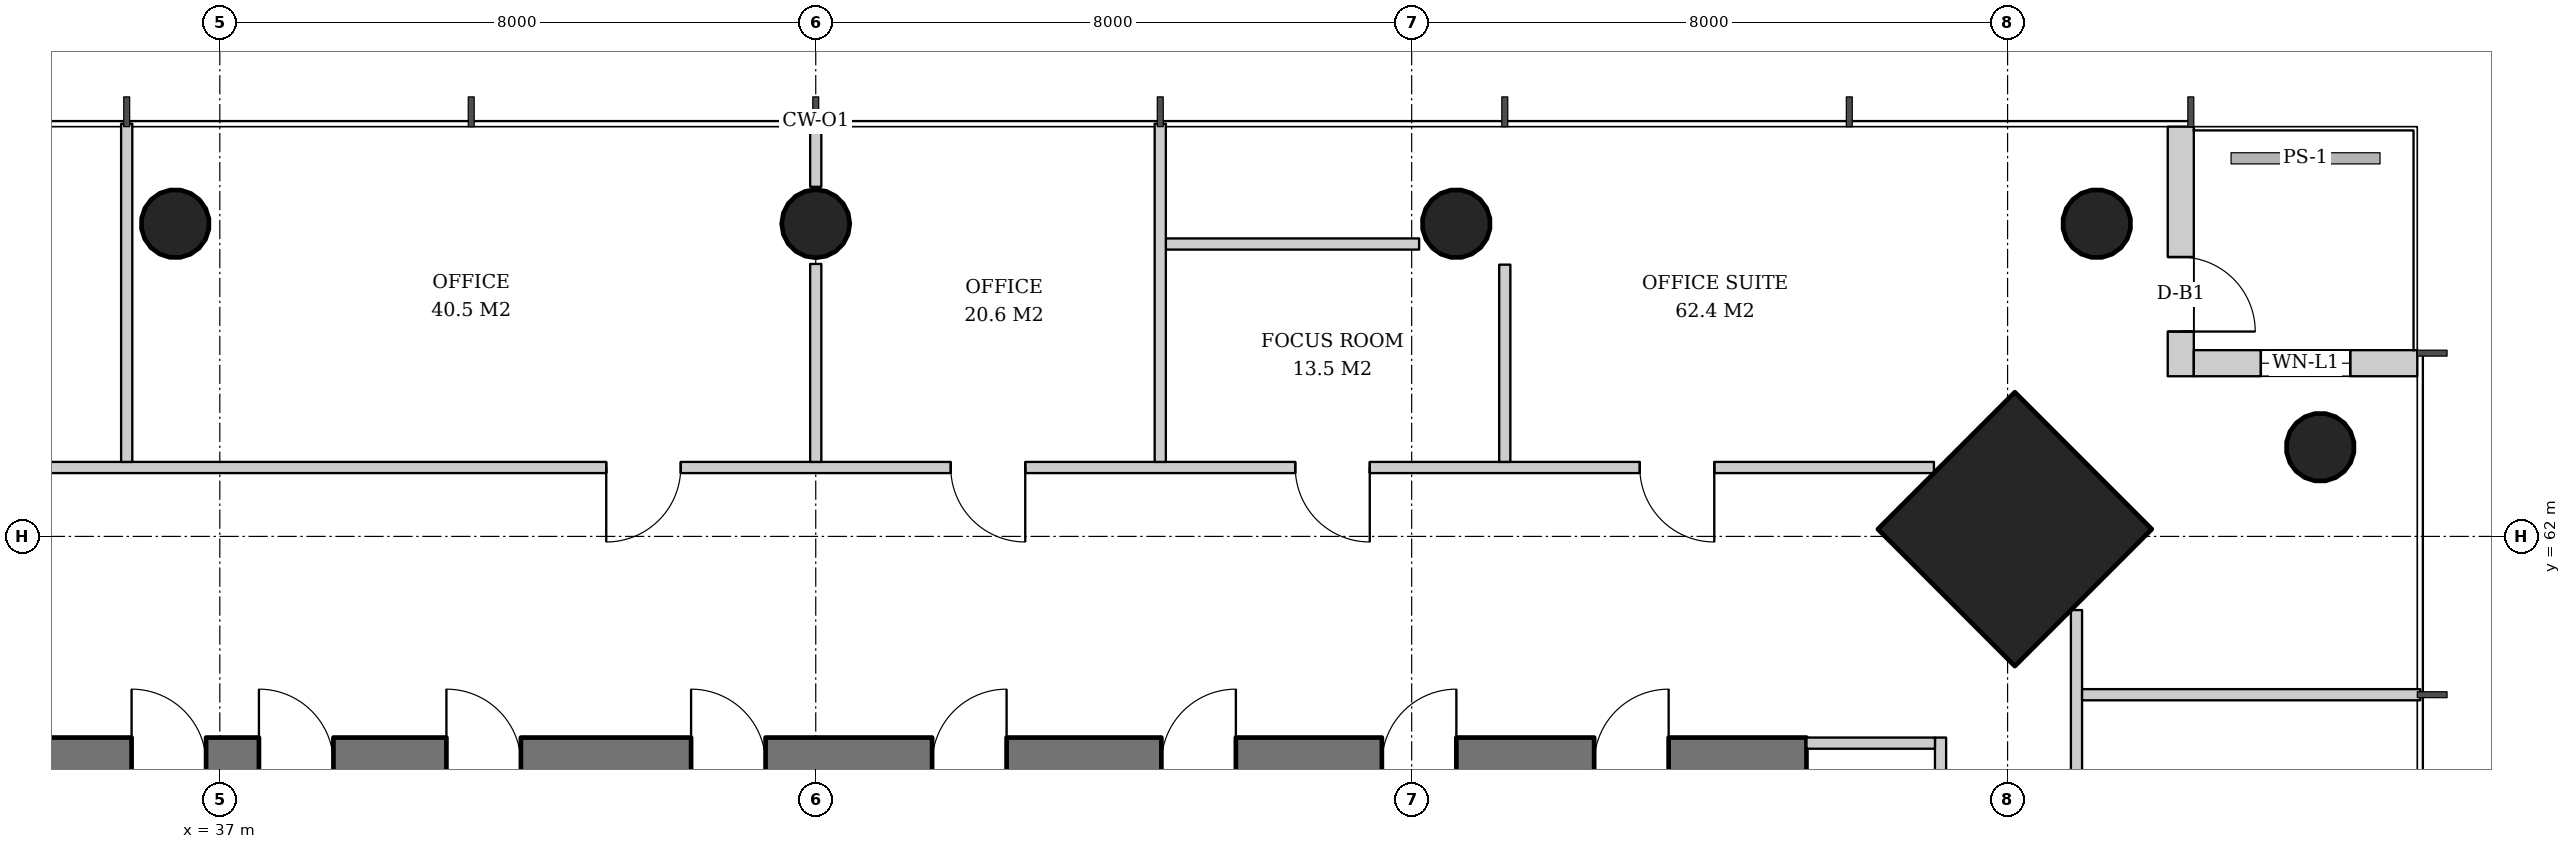
"""IFC4 building model, lengths in metres.
Left out: names, types, materials, properties, quantities, classifications, styles, units other than length and angle.
Written with IfcOpenShell. Run it as: python <this file> out.ifc"""

import sys

from ifc_helpers import new_model, si_unit, direction, frame, frame_2d, origin, origin_2d, place, context, subcontext, project, spatial, rectangle, hollow_circle, extrude, element, fill, save


model = new_model("IFC4")
c1 = context("Model", 3, precision=1e-05, world=origin(), true_north=direction((0.0, 1.0)))
c2 = subcontext(c1, "Body", "Model", "MODEL_VIEW")
j1 = project(units=[si_unit("LENGTHUNIT", "METRE"), si_unit("PLANEANGLEUNIT", "RADIAN")], contexts=[c1])
p1 = place(None, origin())
s1 = spatial("IfcSite", under=j1, at=p1, CompositionType="ELEMENT")
p2 = place(p1, origin())
s2 = spatial("IfcBuilding", under=s1, at=p2, CompositionType="ELEMENT")
p3 = place(p2, frame((0.0, 0.0, 138.8)))
s3 = spatial("IfcBuildingStorey", under=s2, at=p3, CompositionType="ELEMENT", Elevation=138.8)
p4 = place(p3, frame((61.136, 62.136, 0.0), z_axis=(-0.031898107953, -0.031898107953, 0.998981992539), x_axis=(0.707106781187, -0.707106781187, 0.0)))
e1 = element("IfcColumn", 1, at=p4, inside=s3, PredefinedType="COLUMN", context=c2, shape_type="SweptSolid", body=[
    extrude(rectangle(XDim=2.6, YDim=2.6, at=origin_2d()), origin(), (0.0, 0.0, 1.0), 3.804),
])
for number, where, z_axis, x_axis in (
    (2, (65.236, 63.236, 0.0), (-0.032, -0.032, 0.999), (0.707, -0.707, 0.0)),
    (3, (62.236, 66.236, 0.0), (-0.032, -0.032, 0.999), (0.707, -0.707, 0.0)),
):
    element("IfcColumn", number, at=place(p3, frame(where, z_axis=z_axis, x_axis=x_axis)), inside=s3, PredefinedType="COLUMN", context=c2, shape_type="SweptSolid", body=[
        extrude(hollow_circle(Radius=0.457, WallThickness=0.03, at=origin_2d()), origin(), (0.0, 0.0, 1.0), 3.804),
    ])
p5 = place(p3, frame((53.618, 66.236, 0.0), z_axis=(-0.015987237665, -0.031910269556, 0.999362868496), x_axis=(0.894067115991, -0.447933021895, 0.0)))
e4 = element("IfcColumn", 4, at=p5, inside=s3, PredefinedType="COLUMN", context=c2, shape_type="SweptSolid", body=[
    extrude(hollow_circle(Radius=0.457, WallThickness=0.03, at=origin_2d()), origin(), (0.0, 0.0, 1.0), 3.802),
])
p6 = place(p3, frame((45.0, 66.236, 0.0), z_axis=(0.0, -0.031914348339, 0.999490607445), x_axis=(1.0, 0.0, 0.0)))
e5 = element("IfcColumn", 5, at=p6, inside=s3, PredefinedType="COLUMN", context=c2, shape_type="SweptSolid", body=[
    extrude(hollow_circle(Radius=0.457, WallThickness=0.03, at=origin_2d()), origin(), (0.0, 0.0, 1.0), 3.802),
])
p7 = place(p3, frame((36.382, 66.236, 0.0), z_axis=(0.015987237665, -0.031910269556, 0.999362868496), x_axis=(0.894067115991, 0.447933021895, 0.0)))
e6 = element("IfcColumn", 6, at=p7, inside=s3, PredefinedType="COLUMN", context=c2, shape_type="SweptSolid", body=[
    extrude(hollow_circle(Radius=0.457, WallThickness=0.03, at=origin_2d()), origin(), (0.0, 0.0, 1.0), 3.802),
])
p8 = place(p3, frame((31.7, 58.95, 0.0), z_axis=(0.0, 0.0, 1.0), x_axis=(1.0, 0.0, 0.0)))
e7 = element("IfcWall", 7, at=p8, inside=s3, PredefinedType="SHEAR", context=c2, shape_type="SweptSolid", body=[
    extrude(rectangle(XDim=26.6, YDim=0.7, at=frame_2d((13.3, 0.0))), origin(), (0.0, 0.0, 1.0), 3.8),
])
p9 = place(p8, frame((17.94, 0.0, 0.0)))
e8 = element("IfcOpeningElement", 8, at=p9, cuts=e7, PredefinedType="OPENING", context=c2, shape_type="SweptSolid", body=[
    extrude(rectangle(XDim=1.0, YDim=2.1, at=frame_2d((0.5, 1.05))), frame((0.0, 0.36, 0.0), z_axis=(0.0, -1.0, 0.0), x_axis=(1.0, 0.0, 0.0)), (0.0, 0.0, 1.0), 0.72),
])
p10 = place(p8, frame((5.825, 0.0, 0.0)))
e9 = element("IfcOpeningElement", 9, at=p10, cuts=e7, PredefinedType="OPENING", context=c2, shape_type="SweptSolid", body=[
    extrude(rectangle(XDim=1.0, YDim=2.1, at=frame_2d((0.5, 1.05))), frame((0.0, 0.36, 0.0), z_axis=(0.0, -1.0, 0.0), x_axis=(1.0, 0.0, 0.0)), (0.0, 0.0, 1.0), 0.72),
])
p11 = place(p8, frame((1.85, 0.0, 0.0)))
e10 = element("IfcOpeningElement", 10, at=p11, cuts=e7, PredefinedType="OPENING", context=c2, shape_type="SweptSolid", body=[
    extrude(rectangle(XDim=1.0, YDim=2.1, at=frame_2d((0.5, 1.05))), frame((0.0, 0.36, 0.0), z_axis=(0.0, -1.0, 0.0), x_axis=(1.0, 0.0, 0.0)), (0.0, 0.0, 1.0), 0.72),
])
p12 = place(p8, frame((4.115, 0.0, 0.0)))
e11 = element("IfcOpeningElement", 11, at=p12, cuts=e7, PredefinedType="OPENING", context=c2, shape_type="SweptSolid", body=[
    extrude(rectangle(XDim=1.0, YDim=2.1, at=frame_2d((0.5, 1.05))), frame((0.0, 0.36, 0.0), z_axis=(0.0, -1.0, 0.0), x_axis=(1.0, 0.0, 0.0)), (0.0, 0.0, 1.0), 0.72),
])
p13 = place(p8, frame((8.342, 0.0, 0.0)))
e12 = element("IfcOpeningElement", 12, at=p13, cuts=e7, PredefinedType="OPENING", context=c2, shape_type="SweptSolid", body=[
    extrude(rectangle(XDim=1.0, YDim=2.1, at=frame_2d((0.5, 1.05))), frame((0.0, 0.36, 0.0), z_axis=(0.0, -1.0, 0.0), x_axis=(1.0, 0.0, 0.0)), (0.0, 0.0, 1.0), 0.72),
])
p14 = place(p8, frame((11.626, 0.0, 0.0)))
e13 = element("IfcOpeningElement", 13, at=p14, cuts=e7, PredefinedType="OPENING", context=c2, shape_type="SweptSolid", body=[
    extrude(rectangle(XDim=1.0, YDim=2.1, at=frame_2d((0.5, 1.05))), frame((0.0, 0.36, 0.0), z_axis=(0.0, -1.0, 0.0), x_axis=(1.0, 0.0, 0.0)), (0.0, 0.0, 1.0), 0.72),
])
p15 = place(p8, frame((14.862, 0.0, 0.0)))
e14 = element("IfcOpeningElement", 14, at=p15, cuts=e7, PredefinedType="OPENING", context=c2, shape_type="SweptSolid", body=[
    extrude(rectangle(XDim=1.0, YDim=2.1, at=frame_2d((0.5, 1.05))), frame((0.0, 0.36, 0.0), z_axis=(0.0, -1.0, 0.0), x_axis=(1.0, 0.0, 0.0)), (0.0, 0.0, 1.0), 0.72),
])
p16 = place(p8, frame((20.9, 0.0, 0.0)))
e15 = element("IfcOpeningElement", 15, at=p16, cuts=e7, PredefinedType="OPENING", context=c2, shape_type="SweptSolid", body=[
    extrude(rectangle(XDim=1.0, YDim=2.1, at=frame_2d((0.5, 1.05))), frame((0.0, 0.36, 0.0), z_axis=(0.0, -1.0, 0.0), x_axis=(1.0, 0.0, 0.0)), (0.0, 0.0, 1.0), 0.72),
])
p17 = place(p8, frame((23.75, 0.0, 0.0)))
e16 = element("IfcOpeningElement", 16, at=p17, cuts=e7, PredefinedType="OPENING", context=c2, shape_type="SweptSolid", body=[
    extrude(rectangle(XDim=1.0, YDim=2.1, at=frame_2d((0.5, 1.05))), frame((0.0, 0.36, 0.0), z_axis=(0.0, -1.0, 0.0), x_axis=(1.0, 0.0, 0.0)), (0.0, 0.0, 1.0), 0.72),
])
p18 = place(p3, frame((63.325, 67.5, 0.0), z_axis=(0.0, 0.0, 1.0), x_axis=(0.0, -1.0, 0.0)))
e17 = element("IfcWall", 17, at=p18, inside=s3, PredefinedType="SOLIDWALL", context=c2, shape_type="SweptSolid", body=[
    extrude(rectangle(XDim=3.35, YDim=0.35, at=frame_2d((1.675, 0.0))), origin(), (0.0, 0.0, 1.0), 3.62),
])
p19 = place(p18, frame((1.75, 0.0, 0.0)))
e18 = element("IfcOpeningElement", 18, at=p19, cuts=e17, PredefinedType="OPENING", context=c2, shape_type="SweptSolid", body=[
    extrude(rectangle(XDim=1.0, YDim=2.4, at=frame_2d((0.5, 1.2))), frame((0.0, 0.185, 0.0), z_axis=(0.0, -1.0, 0.0), x_axis=(1.0, 0.0, 0.0)), (0.0, 0.0, 1.0), 0.37),
])
p20 = place(p3, frame((63.5, 64.325, 0.0), z_axis=(0.0, 0.0, 1.0), x_axis=(1.0, 0.0, 0.0)))
e19 = element("IfcWall", 19, at=p20, inside=s3, PredefinedType="SOLIDWALL", context=c2, shape_type="SweptSolid", body=[
    extrude(rectangle(XDim=3.0, YDim=0.35, at=frame_2d((1.5, 0.0))), origin(), (0.0, 0.0, 1.0), 3.62),
])
p21 = place(p20, frame((0.9, 0.0, 0.6)))
e20 = element("IfcOpeningElement", 20, at=p21, cuts=e19, PredefinedType="OPENING", context=c2, shape_type="SweptSolid", body=[
    extrude(rectangle(XDim=1.2, YDim=2.55, at=frame_2d((0.6, 1.275))), frame((0.0, 0.185, 0.0), z_axis=(0.0, -1.0, 0.0), x_axis=(1.0, 0.0, 0.0)), (0.0, 0.0, 1.0), 0.37),
])
p22 = place(p3, frame((60.1, 48.025, 0.0), z_axis=(0.0, 0.0, 1.0), x_axis=(0.0, 1.0, 0.0)))
e21 = element("IfcWall", 21, at=p22, inside=s3, PredefinedType="PARTITIONING", context=c2, shape_type="SweptSolid", body=[
    extrude(rectangle(XDim=11.275, YDim=0.15, at=frame_2d((5.638, 0.0))), origin(), (0.0, 0.0, 1.0), 2.806),
])
p23 = place(p22, frame((5.137, 0.0, 0.0)))
e22 = element("IfcOpeningElement", 22, at=p23, cuts=e21, PredefinedType="OPENING", context=c2, shape_type="SweptSolid", body=[
    extrude(rectangle(XDim=1.0, YDim=2.1, at=frame_2d((0.5, 1.05))), frame((0.0, 0.085, 0.0), z_axis=(0.0, -1.0, 0.0), x_axis=(1.0, 0.0, 0.0)), (0.0, 0.0, 1.0), 0.17),
])
p24 = place(p3, frame((58.3, 59.225, 0.0), z_axis=(0.0, 0.0, 1.0), x_axis=(1.0, 0.0, 0.0)))
e23 = element("IfcWall", 23, at=p24, inside=s3, PredefinedType="PARTITIONING", context=c2, shape_type="SweptSolid", body=[
    extrude(rectangle(XDim=1.725, YDim=0.15, at=frame_2d((0.862, 0.0))), origin(), (0.0, 0.0, 1.0), 3.62),
])
p25 = place(p3, frame((61.925, 30.989, 0.0), z_axis=(0.0, 0.0, 1.0), x_axis=(0.0, 1.0, 0.0)))
e24 = element("IfcWall", 24, at=p25, inside=s3, PredefinedType="PARTITIONING", context=c2, shape_type="SweptSolid", body=[
    extrude(rectangle(XDim=30.023, YDim=0.15, at=frame_2d((15.011, 0.0))), origin(), (0.0, 0.0, 1.0), 2.72),
])
p26 = place(p25, frame((2.949, 0.0, 0.0)))
e25 = element("IfcOpeningElement", 25, at=p26, cuts=e24, PredefinedType="OPENING", context=c2, shape_type="SweptSolid", body=[
    extrude(rectangle(XDim=1.0, YDim=2.1, at=frame_2d((0.5, 1.05))), frame((0.0, 0.085, 0.0), z_axis=(0.0, -1.0, 0.0), x_axis=(1.0, 0.0, 0.0)), (0.0, 0.0, 1.0), 0.17),
])
p27 = place(p25, frame((7.574, 0.0, 0.0)))
e26 = element("IfcOpeningElement", 26, at=p27, cuts=e24, PredefinedType="OPENING", context=c2, shape_type="SweptSolid", body=[
    extrude(rectangle(XDim=1.0, YDim=2.1, at=frame_2d((0.5, 1.05))), frame((0.0, 0.085, 0.0), z_axis=(0.0, -1.0, 0.0), x_axis=(1.0, 0.0, 0.0)), (0.0, 0.0, 1.0), 0.17),
])
p28 = place(p25, frame((12.199, 0.0, 0.0)))
e27 = element("IfcOpeningElement", 27, at=p28, cuts=e24, PredefinedType="OPENING", context=c2, shape_type="SweptSolid", body=[
    extrude(rectangle(XDim=1.0, YDim=2.1, at=frame_2d((0.5, 1.05))), frame((0.0, 0.085, 0.0), z_axis=(0.0, -1.0, 0.0), x_axis=(1.0, 0.0, 0.0)), (0.0, 0.0, 1.0), 0.17),
])
p29 = place(p25, frame((16.824, 0.0, 0.0)))
e28 = element("IfcOpeningElement", 28, at=p29, cuts=e24, PredefinedType="OPENING", context=c2, shape_type="SweptSolid", body=[
    extrude(rectangle(XDim=1.0, YDim=2.1, at=frame_2d((0.5, 1.05))), frame((0.0, 0.085, 0.0), z_axis=(0.0, -1.0, 0.0), x_axis=(1.0, 0.0, 0.0)), (0.0, 0.0, 1.0), 0.17),
])
p30 = place(p25, frame((21.449, 0.0, 0.0)))
e29 = element("IfcOpeningElement", 29, at=p30, cuts=e24, PredefinedType="OPENING", context=c2, shape_type="SweptSolid", body=[
    extrude(rectangle(XDim=1.0, YDim=2.1, at=frame_2d((0.5, 1.05))), frame((0.0, 0.085, 0.0), z_axis=(0.0, -1.0, 0.0), x_axis=(1.0, 0.0, 0.0)), (0.0, 0.0, 1.0), 0.17),
])
p31 = place(p25, frame((26.074, 0.0, 0.0)))
e30 = element("IfcOpeningElement", 30, at=p31, cuts=e24, PredefinedType="OPENING", context=c2, shape_type="SweptSolid", body=[
    extrude(rectangle(XDim=1.0, YDim=2.1, at=frame_2d((0.5, 1.05))), frame((0.0, 0.085, 0.0), z_axis=(0.0, -1.0, 0.0), x_axis=(1.0, 0.0, 0.0)), (0.0, 0.0, 1.0), 0.17),
])
p32 = place(p3, frame((62.0, 59.875, 0.0), z_axis=(0.0, 0.0, 1.0), x_axis=(1.0, 0.0, 0.0)))
e31 = element("IfcWall", 31, at=p32, inside=s3, PredefinedType="PARTITIONING", context=c2, shape_type="SweptSolid", body=[
    extrude(rectangle(XDim=4.54, YDim=0.15, at=frame_2d((2.27, 0.0))), origin(), (0.0, 0.0, 1.0), 2.82),
])
p33 = place(p3, frame((53.1, 65.925, 0.0), z_axis=(0.0, 0.0, 1.0), x_axis=(-1.0, 0.0, 0.0)))
e32 = element("IfcWall", 32, at=p33, inside=s3, PredefinedType="PARTITIONING", context=c2, shape_type="SweptSolid", body=[
    extrude(rectangle(XDim=3.4, YDim=0.15, at=frame_2d((1.7, 0.0))), origin(), (0.0, 0.0, 1.0), 2.82),
])
p34 = place(p3, frame((60.011, 62.925, 0.0), z_axis=(0.0, 0.0, 1.0), x_axis=(-1.0, 0.0, 0.0)))
e33 = element("IfcWall", 33, at=p34, inside=s3, PredefinedType="PARTITIONING", context=c2, shape_type="SweptSolid", body=[
    extrude(rectangle(XDim=30.023, YDim=0.15, at=frame_2d((15.011, 0.0))), origin(), (0.0, 0.0, 1.0), 2.72),
])
p35 = place(p34, frame((2.949, 0.0, 0.0)))
e34 = element("IfcOpeningElement", 34, at=p35, cuts=e33, PredefinedType="OPENING", context=c2, shape_type="SweptSolid", body=[
    extrude(rectangle(XDim=1.0, YDim=2.1, at=frame_2d((0.5, 1.05))), frame((0.0, 0.085, 0.0), z_axis=(0.0, -1.0, 0.0), x_axis=(1.0, 0.0, 0.0)), (0.0, 0.0, 1.0), 0.17),
])
p36 = place(p34, frame((7.574, 0.0, 0.0)))
e35 = element("IfcOpeningElement", 35, at=p36, cuts=e33, PredefinedType="OPENING", context=c2, shape_type="SweptSolid", body=[
    extrude(rectangle(XDim=1.0, YDim=2.1, at=frame_2d((0.5, 1.05))), frame((0.0, 0.085, 0.0), z_axis=(0.0, -1.0, 0.0), x_axis=(1.0, 0.0, 0.0)), (0.0, 0.0, 1.0), 0.17),
])
p37 = place(p34, frame((12.199, 0.0, 0.0)))
e36 = element("IfcOpeningElement", 36, at=p37, cuts=e33, PredefinedType="OPENING", context=c2, shape_type="SweptSolid", body=[
    extrude(rectangle(XDim=1.0, YDim=2.1, at=frame_2d((0.5, 1.05))), frame((0.0, 0.085, 0.0), z_axis=(0.0, -1.0, 0.0), x_axis=(1.0, 0.0, 0.0)), (0.0, 0.0, 1.0), 0.17),
])
p38 = place(p34, frame((16.824, 0.0, 0.0)))
e37 = element("IfcOpeningElement", 37, at=p38, cuts=e33, PredefinedType="OPENING", context=c2, shape_type="SweptSolid", body=[
    extrude(rectangle(XDim=1.0, YDim=2.1, at=frame_2d((0.5, 1.05))), frame((0.0, 0.085, 0.0), z_axis=(0.0, -1.0, 0.0), x_axis=(1.0, 0.0, 0.0)), (0.0, 0.0, 1.0), 0.17),
])
p39 = place(p34, frame((26.074, 0.0, 0.0)))
e38 = element("IfcOpeningElement", 38, at=p39, cuts=e33, PredefinedType="OPENING", context=c2, shape_type="SweptSolid", body=[
    extrude(rectangle(XDim=1.0, YDim=2.1, at=frame_2d((0.5, 1.05))), frame((0.0, 0.085, 0.0), z_axis=(0.0, -1.0, 0.0), x_axis=(1.0, 0.0, 0.0)), (0.0, 0.0, 1.0), 0.17),
])
p40 = place(p3, frame((54.25, 63.0, 0.0), z_axis=(0.0, 0.0, 1.0), x_axis=(0.0, 1.0, 0.0)))
e39 = element("IfcWall", 39, at=p40, inside=s3, PredefinedType="PARTITIONING", context=c2, shape_type="SweptSolid", body=[
    extrude(rectangle(XDim=2.648, YDim=0.15, at=frame_2d((1.324, 0.0))), origin(), (0.0, 0.0, 1.0), 3.62),
])
p41 = place(p3, frame((49.625, 63.0, 0.0), z_axis=(0.0, 0.0, 1.0), x_axis=(0.0, 1.0, 0.0)))
e40 = element("IfcWall", 40, at=p41, inside=s3, PredefinedType="PARTITIONING", context=c2, shape_type="SweptSolid", body=[
    extrude(rectangle(XDim=4.54, YDim=0.15, at=frame_2d((2.27, 0.0))), origin(), (0.0, 0.0, 1.0), 2.82),
])
p42 = place(p3, frame((45.0, 63.0, 0.0), z_axis=(0.0, 0.0, 1.0), x_axis=(0.0, 1.0, 0.0)))
e41 = element("IfcWall", 41, at=p42, inside=s3, PredefinedType="PARTITIONING", context=c2, shape_type="SweptSolid", body=[
    extrude(rectangle(XDim=2.657, YDim=0.15, at=frame_2d((1.329, 0.0))), origin(), (0.0, 0.0, 1.0), 3.62),
])
p43 = place(p3, frame((45.0, 66.693, 0.0), z_axis=(0.0, 0.0, 1.0), x_axis=(0.0, 1.0, 0.0)))
e42 = element("IfcWall", 42, at=p43, inside=s3, PredefinedType="PARTITIONING", context=c2, shape_type="SweptSolid", body=[
    extrude(rectangle(XDim=0.847, YDim=0.15, at=frame_2d((0.424, 0.0))), origin(), (0.0, 0.0, 1.0), 3.62),
])
p44 = place(p3, frame((35.75, 63.0, 0.0), z_axis=(0.0, 0.0, 1.0), x_axis=(0.0, 1.0, 0.0)))
e43 = element("IfcWall", 43, at=p44, inside=s3, PredefinedType="PARTITIONING", context=c2, shape_type="SweptSolid", body=[
    extrude(rectangle(XDim=4.54, YDim=0.15, at=frame_2d((2.27, 0.0))), origin(), (0.0, 0.0, 1.0), 2.82),
])
p45 = place(p19, origin())
e44 = element("IfcDoor", 44, at=p45, inside=s3, OperationType="SINGLE_SWING_RIGHT", PredefinedType="DOOR", context=c2, shape_type="SweptSolid", body=[
    extrude(rectangle(XDim=1.0, YDim=2.4, at=frame_2d((0.5, 1.2))), frame((0.0, 0.025, 0.0), z_axis=(0.0, -1.0, 0.0), x_axis=(1.0, 0.0, 0.0)), (0.0, 0.0, 1.0), 0.05),
])
fill(e18, e44)
p46 = place(p21, origin())
e45 = element("IfcWindow", 45, at=p46, inside=s3, PartitioningType="SINGLE_PANEL", PredefinedType="WINDOW", context=c2, shape_type="SweptSolid", body=[
    extrude(rectangle(XDim=1.2, YDim=2.55, at=frame_2d((0.6, 1.275))), frame((0.0, 0.03, 0.0), z_axis=(0.0, -1.0, 0.0), x_axis=(1.0, 0.0, 0.0)), (0.0, 0.0, 1.0), 0.06),
])
fill(e20, e45)
p47 = place(p9, origin())
e46 = element("IfcDoor", 46, at=p47, inside=s3, OperationType="SINGLE_SWING_RIGHT", PredefinedType="DOOR", context=c2, shape_type="SweptSolid", body=[
    extrude(rectangle(XDim=1.0, YDim=2.1, at=frame_2d((0.5, 1.05))), frame((0.0, 0.025, 0.0), z_axis=(0.0, -1.0, 0.0), x_axis=(1.0, 0.0, 0.0)), (0.0, 0.0, 1.0), 0.05),
])
fill(e8, e46)
p48 = place(p10, origin())
e47 = element("IfcDoor", 47, at=p48, inside=s3, OperationType="SINGLE_SWING_LEFT", PredefinedType="DOOR", context=c2, shape_type="SweptSolid", body=[
    extrude(rectangle(XDim=1.0, YDim=2.1, at=frame_2d((0.5, 1.05))), frame((0.0, 0.025, 0.0), z_axis=(0.0, -1.0, 0.0), x_axis=(1.0, 0.0, 0.0)), (0.0, 0.0, 1.0), 0.05),
])
fill(e9, e47)
p49 = place(p35, origin())
e48 = element("IfcDoor", 48, at=p49, inside=s3, OperationType="SINGLE_SWING_LEFT", PredefinedType="DOOR", context=c2, shape_type="SweptSolid", body=[
    extrude(rectangle(XDim=1.0, YDim=2.1, at=frame_2d((0.5, 1.05))), frame((0.0, 0.025, 0.0), z_axis=(0.0, -1.0, 0.0), x_axis=(1.0, 0.0, 0.0)), (0.0, 0.0, 1.0), 0.05),
])
fill(e34, e48)
p50 = place(p36, origin())
e49 = element("IfcDoor", 49, at=p50, inside=s3, OperationType="SINGLE_SWING_LEFT", PredefinedType="DOOR", context=c2, shape_type="SweptSolid", body=[
    extrude(rectangle(XDim=1.0, YDim=2.1, at=frame_2d((0.5, 1.05))), frame((0.0, 0.025, 0.0), z_axis=(0.0, -1.0, 0.0), x_axis=(1.0, 0.0, 0.0)), (0.0, 0.0, 1.0), 0.05),
])
fill(e35, e49)
p51 = place(p37, origin())
e50 = element("IfcDoor", 50, at=p51, inside=s3, OperationType="SINGLE_SWING_LEFT", PredefinedType="DOOR", context=c2, shape_type="SweptSolid", body=[
    extrude(rectangle(XDim=1.0, YDim=2.1, at=frame_2d((0.5, 1.05))), frame((0.0, 0.025, 0.0), z_axis=(0.0, -1.0, 0.0), x_axis=(1.0, 0.0, 0.0)), (0.0, 0.0, 1.0), 0.05),
])
fill(e36, e50)
p52 = place(p38, origin())
e51 = element("IfcDoor", 51, at=p52, inside=s3, OperationType="SINGLE_SWING_RIGHT", PredefinedType="DOOR", context=c2, shape_type="SweptSolid", body=[
    extrude(rectangle(XDim=1.0, YDim=2.1, at=frame_2d((0.5, 1.05))), frame((0.0, 0.025, 0.0), z_axis=(0.0, -1.0, 0.0), x_axis=(1.0, 0.0, 0.0)), (0.0, 0.0, 1.0), 0.05),
])
fill(e37, e51)
save(model, sys.argv[1])
